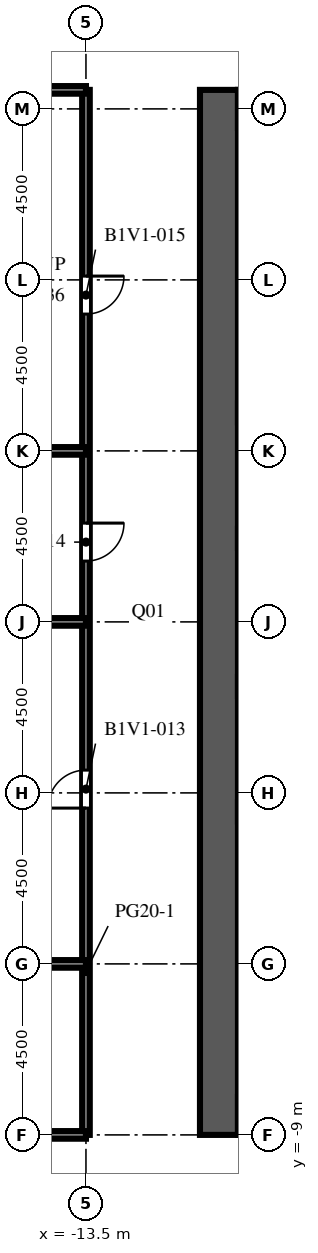
"""IFC4 building model, lengths in metres.
Left out: names, types, materials, properties, quantities, classifications, styles, units other than length and angle.
Written with IfcOpenShell. Run it as: python <this file> out.ifc"""

import sys

from ifc_helpers import new_model, si_unit, direction, frame, frame_2d, origin, place, context, subcontext, project, spatial, rectangle, extrude, element, fill, save


model = new_model("IFC4")
c1 = context("Model", 3, precision=1e-05, world=origin(), true_north=direction((0.0, 1.0)))
c2 = subcontext(c1, "Body", "Model", "MODEL_VIEW")
j1 = project(units=[si_unit("LENGTHUNIT", "METRE"), si_unit("PLANEANGLEUNIT", "RADIAN")], contexts=[c1])
p1 = place(None, origin())
s1 = spatial("IfcSite", under=j1, at=p1, CompositionType="ELEMENT")
p2 = place(p1, origin())
s2 = spatial("IfcBuilding", under=s1, at=p2, CompositionType="ELEMENT")
p3 = place(p2, frame((0.0, 0.0, 19.5)))
s3 = spatial("IfcBuildingStorey", under=s2, at=p3, CompositionType="ELEMENT", Elevation=19.5)
p4 = place(p3, frame((-10.0, -9.0, 0.0), z_axis=(0.0, 0.0, 1.0), x_axis=(0.0, 1.0, 0.0)))
e1 = element("IfcWall", 1, at=p4, inside=s3, PredefinedType="SHEAR", context=c2, shape_type="SweptSolid", body=[
    extrude(rectangle(XDim=27.5, YDim=1.0, at=frame_2d((13.75, 0.0))), origin(), (0.0, 0.0, 1.0), 4.1),
])
p5 = place(p4, frame((12.55, 0.0, 0.0)))
e2 = element("IfcOpeningElement", 2, at=p5, cuts=e1, PredefinedType="OPENING", context=c2, shape_type="SweptSolid", body=[
    extrude(rectangle(XDim=2.4, YDim=2.4, at=frame_2d((1.2, 1.2))), frame((0.0, 0.51, 0.0), z_axis=(0.0, -1.0, 0.0), x_axis=(1.0, 0.0, 0.0)), (0.0, 0.0, 1.0), 1.02),
])
p6 = place(p4, frame((6.825, 0.0, 0.0)))
e3 = element("IfcOpeningElement", 3, at=p6, cuts=e1, PredefinedType="OPENING", context=c2, shape_type="SweptSolid", body=[
    extrude(rectangle(XDim=1.2, YDim=2.1, at=frame_2d((0.6, 1.05))), frame((0.0, 0.51, 0.0), z_axis=(0.0, -1.0, 0.0), x_axis=(1.0, 0.0, 0.0)), (0.0, 0.0, 1.0), 1.02),
])
p7 = place(p4, frame((19.475, 0.0, 0.0)))
e4 = element("IfcOpeningElement", 4, at=p7, cuts=e1, PredefinedType="OPENING", context=c2, shape_type="SweptSolid", body=[
    extrude(rectangle(XDim=1.2, YDim=2.1, at=frame_2d((0.6, 1.05))), frame((0.0, 0.51, 0.0), z_axis=(0.0, -1.0, 0.0), x_axis=(1.0, 0.0, 0.0)), (0.0, 0.0, 1.0), 1.02),
])
p8 = place(p3, frame((-13.5, -9.0, 0.0), z_axis=(0.0, 0.0, 1.0), x_axis=(0.0, 1.0, 0.0)))
e5 = element("IfcWall", 5, at=p8, inside=s3, PredefinedType="PARTITIONING", context=c2, shape_type="SweptSolid", body=[
    extrude(rectangle(XDim=27.5, YDim=0.2, at=frame_2d((13.75, 0.0))), origin(), (0.0, 0.0, 1.0), 3.65),
])
p9 = place(p8, frame((8.6, 0.0, 0.0)))
e6 = element("IfcOpeningElement", 6, at=p9, cuts=e5, PredefinedType="OPENING", context=c2, shape_type="SweptSolid", body=[
    extrude(rectangle(XDim=1.0, YDim=2.1, at=frame_2d((0.5, 1.05))), frame((0.0, 0.11, 0.0), z_axis=(0.0, -1.0, 0.0), x_axis=(1.0, 0.0, 0.0)), (0.0, 0.0, 1.0), 0.22),
])
p10 = place(p8, frame((15.1, 0.0, 0.0)))
e7 = element("IfcOpeningElement", 7, at=p10, cuts=e5, PredefinedType="OPENING", context=c2, shape_type="SweptSolid", body=[
    extrude(rectangle(XDim=1.0, YDim=2.1, at=frame_2d((0.5, 1.05))), frame((0.0, 0.11, 0.0), z_axis=(0.0, -1.0, 0.0), x_axis=(1.0, 0.0, 0.0)), (0.0, 0.0, 1.0), 0.22),
])
p11 = place(p8, frame((21.6, 0.0, 0.0)))
e8 = element("IfcOpeningElement", 8, at=p11, cuts=e5, PredefinedType="OPENING", context=c2, shape_type="SweptSolid", body=[
    extrude(rectangle(XDim=1.0, YDim=2.1, at=frame_2d((0.5, 1.05))), frame((0.0, 0.11, 0.0), z_axis=(0.0, -1.0, 0.0), x_axis=(1.0, 0.0, 0.0)), (0.0, 0.0, 1.0), 0.22),
])
p12 = place(p3, frame((-17.2, -9.0, 0.0), z_axis=(0.0, 0.0, 1.0), x_axis=(1.0, 0.0, 0.0)))
e9 = element("IfcWall", 9, at=p12, inside=s3, PredefinedType="PARTITIONING", context=c2, shape_type="SweptSolid", body=[
    extrude(rectangle(XDim=3.7, YDim=0.2, at=frame_2d((1.85, 0.0))), origin(), (0.0, 0.0, 1.0), 3.65),
])
for number, where, z_axis, x_axis in (
    (10, (-26.3, -4.5, 0.0), (0.0, 0.0, 1.0), (1.0, 0.0, 0.0)),
    (11, (-26.3, 4.5, 0.0), (0.0, 0.0, 1.0), (1.0, 0.0, 0.0)),
):
    element("IfcWall", number, at=place(p3, frame(where, z_axis=z_axis, x_axis=x_axis)), inside=s3, PredefinedType="PARTITIONING", context=c2, shape_type="SweptSolid", body=[
        extrude(rectangle(XDim=12.8, YDim=0.2, at=frame_2d((6.4, 0.0))), origin(), (0.0, 0.0, 1.0), 3.65),
    ])
for number, where, z_axis, x_axis in (
    (12, (-17.2, 9.0, 0.0), (0.0, 0.0, 1.0), (1.0, 0.0, 0.0)),
    (13, (-17.2, 18.5, 0.0), (0.0, 0.0, 1.0), (1.0, 0.0, 0.0)),
):
    element("IfcWall", number, at=place(p3, frame(where, z_axis=z_axis, x_axis=x_axis)), inside=s3, PredefinedType="PARTITIONING", context=c2, shape_type="SweptSolid", body=[
        extrude(rectangle(XDim=3.7, YDim=0.2, at=frame_2d((1.85, 0.0))), origin(), (0.0, 0.0, 1.0), 3.65),
    ])
p13 = place(p5, origin())
e14 = element("IfcDoor", 14, at=p13, inside=s3, OperationType="DOUBLE_DOOR_DOUBLE_SWING", PredefinedType="DOOR", context=c2, shape_type="SweptSolid", body=[
    extrude(rectangle(XDim=2.4, YDim=2.4, at=frame_2d((1.2, 1.2))), frame((0.0, 0.025, 0.0), z_axis=(0.0, -1.0, 0.0), x_axis=(1.0, 0.0, 0.0)), (0.0, 0.0, 1.0), 0.05),
])
fill(e2, e14)
p14 = place(p6, origin())
e15 = element("IfcDoor", 15, at=p14, inside=s3, OperationType="SINGLE_SWING_LEFT", PredefinedType="DOOR", context=c2, shape_type="SweptSolid", body=[
    extrude(rectangle(XDim=1.2, YDim=2.1, at=frame_2d((0.6, 1.05))), frame((0.0, 0.025, 0.0), z_axis=(0.0, -1.0, 0.0), x_axis=(1.0, 0.0, 0.0)), (0.0, 0.0, 1.0), 0.05),
])
fill(e3, e15)
p15 = place(p7, origin())
e16 = element("IfcDoor", 16, at=p15, inside=s3, OperationType="SINGLE_SWING_LEFT", PredefinedType="DOOR", context=c2, shape_type="SweptSolid", body=[
    extrude(rectangle(XDim=1.2, YDim=2.1, at=frame_2d((0.6, 1.05))), frame((0.0, 0.025, 0.0), z_axis=(0.0, -1.0, 0.0), x_axis=(1.0, 0.0, 0.0)), (0.0, 0.0, 1.0), 0.05),
])
fill(e4, e16)
p16 = place(p9, origin())
e17 = element("IfcDoor", 17, at=p16, inside=s3, OperationType="SINGLE_SWING_LEFT", PredefinedType="DOOR", context=c2, shape_type="SweptSolid", body=[
    extrude(rectangle(XDim=1.0, YDim=2.1, at=frame_2d((0.5, 1.05))), frame((0.0, 0.025, 0.0), z_axis=(0.0, -1.0, 0.0), x_axis=(1.0, 0.0, 0.0)), (0.0, 0.0, 1.0), 0.05),
])
fill(e6, e17)
p17 = place(p10, origin())
e18 = element("IfcDoor", 18, at=p17, inside=s3, OperationType="SINGLE_SWING_RIGHT", PredefinedType="DOOR", context=c2, shape_type="SweptSolid", body=[
    extrude(rectangle(XDim=1.0, YDim=2.1, at=frame_2d((0.5, 1.05))), frame((0.0, 0.025, 0.0), z_axis=(0.0, -1.0, 0.0), x_axis=(1.0, 0.0, 0.0)), (0.0, 0.0, 1.0), 0.05),
])
fill(e7, e18)
p18 = place(p11, origin())
e19 = element("IfcDoor", 19, at=p18, inside=s3, OperationType="SINGLE_SWING_RIGHT", PredefinedType="DOOR", context=c2, shape_type="SweptSolid", body=[
    extrude(rectangle(XDim=1.0, YDim=2.1, at=frame_2d((0.5, 1.05))), frame((0.0, 0.025, 0.0), z_axis=(0.0, -1.0, 0.0), x_axis=(1.0, 0.0, 0.0)), (0.0, 0.0, 1.0), 0.05),
])
fill(e8, e19)
save(model, sys.argv[1])
